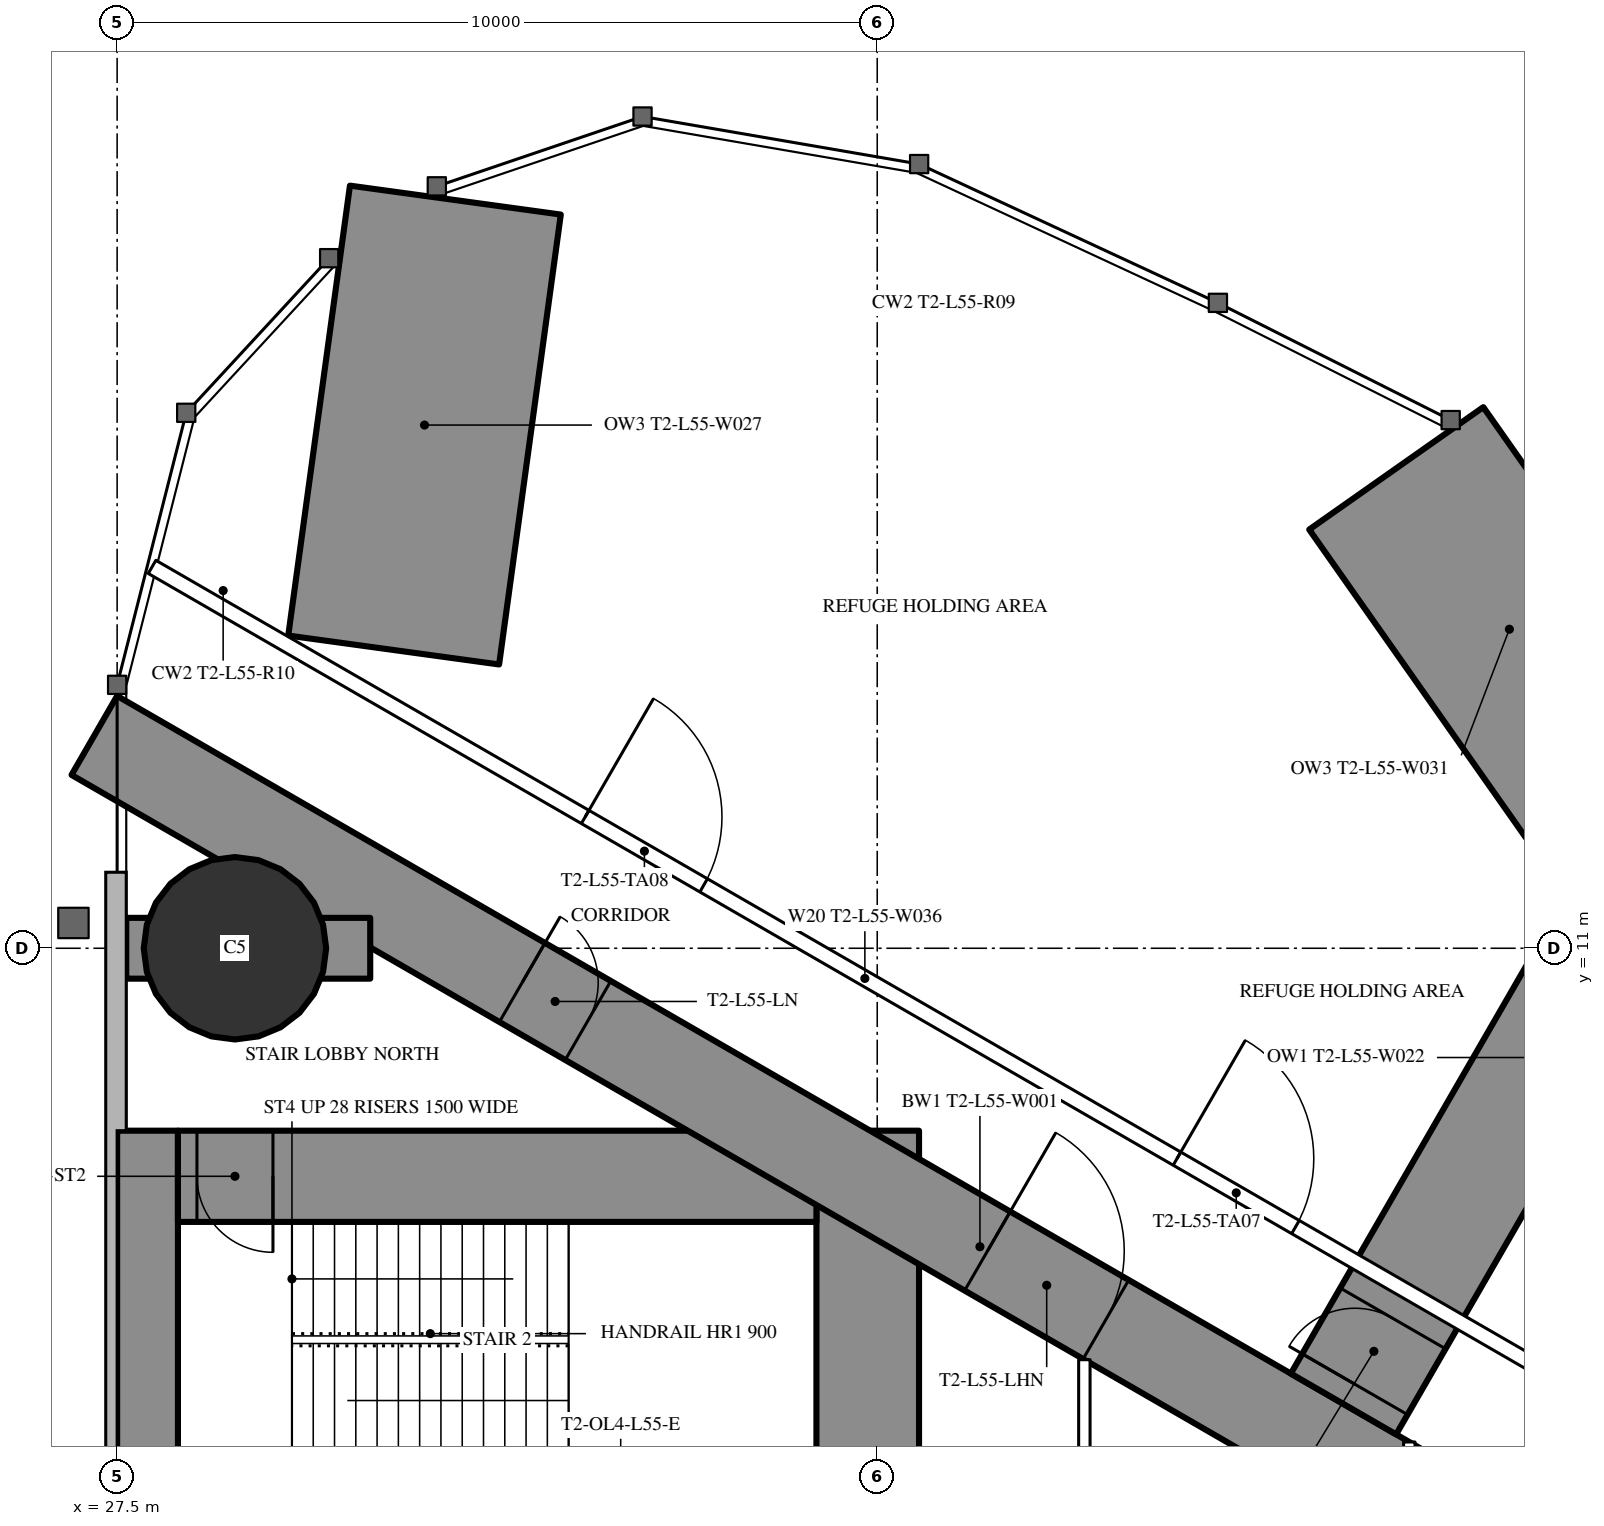
"""IFC4 building model, lengths in metres.
Left out: names, types, materials, properties, quantities, classifications, styles, units other than length and angle.
Written with IfcOpenShell. Run it as: python <this file> out.ifc"""

import sys

from ifc_helpers import new_model, si_unit, direction, frame, frame_2d, origin, origin_2d, place, context, subcontext, project, spatial, rectangle, hollow_circle, extrude, element, fill, save


model = new_model("IFC4")
c1 = context("Model", 3, precision=1e-05, world=origin(), true_north=direction((0.0, 1.0)))
c2 = subcontext(c1, "Body", "Model", "MODEL_VIEW")
j1 = project(units=[si_unit("LENGTHUNIT", "METRE"), si_unit("PLANEANGLEUNIT", "RADIAN")], contexts=[c1])
p1 = place(None, origin())
s1 = spatial("IfcSite", under=j1, at=p1, CompositionType="ELEMENT")
p2 = place(p1, origin())
s2 = spatial("IfcBuilding", under=s1, at=p2, CompositionType="ELEMENT")
p3 = place(p2, frame((0.0, 0.0, 205.3)))
s3 = spatial("IfcBuildingStorey", under=s2, at=p3, CompositionType="ELEMENT", Elevation=205.3)
p4 = place(p3, frame((31.95, 20.843, 0.0), z_axis=(0.0, 0.0, 1.0), x_axis=(-0.135869920729, -0.990726685136, 0.0)))
e1 = element("IfcWall", 1, at=p4, inside=s3, PredefinedType="SHEAR", context=c2, shape_type="SweptSolid", body=[
    extrude(rectangle(XDim=5.975, YDim=2.8, at=frame_2d((2.987, 0.0))), origin(), (0.0, 0.0, 1.0), 5.0),
])
p5 = place(p3, frame((29.05, 11.0, 0.0), z_axis=(0.0, 0.0, 1.0), x_axis=(1.0, 0.0, 0.0)))
e2 = element("IfcColumn", 2, at=p5, inside=s3, PredefinedType="COLUMN", context=c2, shape_type="SweptSolid", body=[
    extrude(hollow_circle(Radius=1.2, WallThickness=0.09, at=origin_2d()), origin(), (0.0, 0.0, 1.0), 5.0),
])
p6 = place(p3, frame((44.328, 17.314, 0.0), z_axis=(0.0, 0.0, 1.0), x_axis=(0.575107689221, -0.818077713789, 0.0)))
e3 = element("IfcWall", 3, at=p6, inside=s3, PredefinedType="SHEAR", context=c2, shape_type="SweptSolid", body=[
    extrude(rectangle(XDim=5.175, YDim=2.8, at=frame_2d((2.587, 0.0))), origin(), (0.0, 0.0, 1.0), 5.0),
])
p7 = place(p3, frame((27.9, -8.6, 0.0), z_axis=(0.0, 0.0, 1.0), x_axis=(0.0, 1.0, 0.0)))
e4 = element("IfcWall", 4, at=p7, inside=s3, PredefinedType="SHEAR", context=c2, shape_type="SweptSolid", body=[
    extrude(rectangle(XDim=17.2, YDim=0.8, at=frame_2d((8.6, 0.0))), origin(), (0.0, 0.0, 1.0), 5.0),
])
p8 = place(p7, frame((9.35, 0.0, 0.0)))
e5 = element("IfcOpeningElement", 5, at=p8, cuts=e4, PredefinedType="OPENING", context=c2, shape_type="SweptSolid", body=[
    extrude(rectangle(XDim=0.9, YDim=2.2, at=frame_2d((0.45, 1.1))), frame((0.0, 0.41, 0.0), z_axis=(0.0, -1.0, 0.0), x_axis=(1.0, 0.0, 0.0)), (0.0, 0.0, 1.0), 0.82),
])
p9 = place(p3, frame((37.375, -8.6, 0.0), z_axis=(0.0, 0.0, 1.0), x_axis=(0.0, 1.0, 0.0)))
e6 = element("IfcWall", 6, at=p9, inside=s3, PredefinedType="SHEAR", context=c2, shape_type="SweptSolid", body=[
    extrude(rectangle(XDim=17.2, YDim=1.35, at=frame_2d((8.6, 0.0))), origin(), (0.0, 0.0, 1.0), 5.0),
])
p10 = place(p9, frame((7.7, 0.0, 0.0)))
e7 = element("IfcOpeningElement", 7, at=p10, cuts=e6, PredefinedType="OPENING", context=c2, shape_type="SweptSolid", body=[
    extrude(rectangle(XDim=1.8, YDim=2.2, at=frame_2d((0.9, 1.1))), frame((0.0, 0.685, 0.0), z_axis=(0.0, -1.0, 0.0), x_axis=(1.0, 0.0, 0.0)), (0.0, 0.0, 1.0), 1.37),
])
p11 = place(p3, frame((28.3, 8.0, 0.0), z_axis=(0.0, 0.0, 1.0), x_axis=(1.0, 0.0, 0.0)))
e8 = element("IfcWall", 8, at=p11, inside=s3, PredefinedType="SHEAR", context=c2, shape_type="SweptSolid", body=[
    extrude(rectangle(XDim=8.4, YDim=1.2, at=frame_2d((4.2, 0.0))), origin(), (0.0, 0.0, 1.0), 5.0),
])
p12 = place(p11, frame((0.25, 0.0, 0.0)))
e9 = element("IfcOpeningElement", 9, at=p12, cuts=e8, PredefinedType="OPENING", context=c2, shape_type="SweptSolid", body=[
    extrude(rectangle(XDim=1.0, YDim=2.2, at=frame_2d((0.5, 1.1))), frame((0.0, 0.61, 0.0), z_axis=(0.0, -1.0, 0.0), x_axis=(1.0, 0.0, 0.0)), (0.0, 0.0, 1.0), 1.22),
])
p13 = place(p3, frame((27.2, 13.8, 0.0), z_axis=(0.0, 0.0, 1.0), x_axis=(0.866024515034, -0.500001539357, 0.0)))
e10 = element("IfcWall", 10, at=p13, inside=s3, PredefinedType="SHEAR", context=c2, shape_type="SweptSolid", body=[
    extrude(rectangle(XDim=26.907, YDim=1.2, at=frame_2d((13.454, 0.0))), origin(), (0.0, 0.0, 1.0), 5.0),
])
p14 = place(p13, frame((6.5, 0.0, 0.0)))
e11 = element("IfcOpeningElement", 11, at=p14, cuts=e10, PredefinedType="OPENING", context=c2, shape_type="SweptSolid", body=[
    extrude(rectangle(XDim=1.0, YDim=2.2, at=frame_2d((0.5, 1.1))), frame((0.0, 0.61, 0.0), z_axis=(0.0, -1.0, 0.0), x_axis=(1.0, 0.0, 0.0)), (0.0, 0.0, 1.0), 1.22),
])
p15 = place(p13, frame((13.568, 0.0, 0.0)))
e12 = element("IfcOpeningElement", 12, at=p15, cuts=e10, PredefinedType="OPENING", context=c2, shape_type="SweptSolid", body=[
    extrude(rectangle(XDim=1.8, YDim=2.2, at=frame_2d((0.9, 1.1))), frame((0.0, 0.61, 0.0), z_axis=(0.0, -1.0, 0.0), x_axis=(1.0, 0.0, 0.0)), (0.0, 0.0, 1.0), 1.22),
])
p16 = place(p3, frame((27.62, 11.0, 0.0), z_axis=(0.0, 0.0, 1.0), x_axis=(1.0, 0.0, 0.0)))
e13 = element("IfcWall", 13, at=p16, inside=s3, PredefinedType="SHEAR", context=c2, shape_type="SweptSolid", body=[
    extrude(rectangle(XDim=3.209, YDim=0.8, at=frame_2d((1.605, 0.0))), origin(), (0.0, 0.0, 1.0), 5.0),
])
p17 = place(p3, frame((43.634, 5.004, 0.0), z_axis=(0.0, 0.0, 1.0), x_axis=(0.499995493849, 0.866028005396, 0.0)))
e14 = element("IfcWall", 14, at=p17, inside=s3, PredefinedType="SHEAR", context=c2, shape_type="SweptSolid", body=[
    extrude(rectangle(XDim=10.526, YDim=1.6, at=frame_2d((5.263, 0.0))), origin(), (0.0, 0.0, 1.0), 5.0),
])
p18 = place(p17, frame((0.3, 0.0, 0.0)))
e15 = element("IfcOpeningElement", 15, at=p18, cuts=e14, PredefinedType="OPENING", context=c2, shape_type="SweptSolid", body=[
    extrude(rectangle(XDim=1.0, YDim=2.2, at=frame_2d((0.5, 1.1))), frame((0.0, 0.81, 0.0), z_axis=(0.0, -1.0, 0.0), x_axis=(1.0, 0.0, 0.0)), (0.0, 0.0, 1.0), 1.62),
])
p19 = place(p3, frame((27.959, 16.017, 0.0), z_axis=(0.0, 0.0, 1.0), x_axis=(0.866027146794, -0.499996981007, 0.0)))
e16 = element("IfcWall", 16, at=p19, inside=s3, PredefinedType="PARTITIONING", context=c2, shape_type="SweptSolid", body=[
    extrude(rectangle(XDim=21.657, YDim=0.2, at=frame_2d((10.829, 0.0))), origin(), (0.0, 0.0, 1.0), 4.75),
])
p20 = place(p19, frame((15.57, 0.0, 0.0)))
e17 = element("IfcOpeningElement", 17, at=p20, cuts=e16, PredefinedType="OPENING", context=c2, shape_type="SweptSolid", body=[
    extrude(rectangle(XDim=1.8, YDim=2.2, at=frame_2d((0.9, 1.1))), frame((0.0, 0.11, 0.0), z_axis=(0.0, -1.0, 0.0), x_axis=(1.0, 0.0, 0.0)), (0.0, 0.0, 1.0), 0.22),
])
p21 = place(p19, frame((6.579, 0.0, 0.0)))
e18 = element("IfcOpeningElement", 18, at=p21, cuts=e16, PredefinedType="OPENING", context=c2, shape_type="SweptSolid", body=[
    extrude(rectangle(XDim=1.8, YDim=2.2, at=frame_2d((0.9, 1.1))), frame((0.0, 0.11, 0.0), z_axis=(0.0, -1.0, 0.0), x_axis=(1.0, 0.0, 0.0)), (0.0, 0.0, 1.0), 0.22),
])
p22 = place(p3, frame((40.225, -5.587, 0.0), z_axis=(0.0, 0.0, 1.0), x_axis=(0.0, 1.0, 0.0)))
e19 = element("IfcWall", 19, at=p22, inside=s3, PredefinedType="PARTITIONING", context=c2, shape_type="SweptSolid", body=[
    extrude(rectangle(XDim=11.174, YDim=0.15, at=frame_2d((5.587, 0.0))), origin(), (0.0, 0.0, 1.0), 4.75),
])
p23 = place(p22, frame((4.687, 0.0, 0.0)))
e20 = element("IfcOpeningElement", 20, at=p23, cuts=e19, PredefinedType="OPENING", context=c2, shape_type="SweptSolid", body=[
    extrude(rectangle(XDim=1.8, YDim=2.2, at=frame_2d((0.9, 1.1))), frame((0.0, 0.085, 0.0), z_axis=(0.0, -1.0, 0.0), x_axis=(1.0, 0.0, 0.0)), (0.0, 0.0, 1.0), 0.17),
])
p24 = place(p3, frame((44.5, -4.505, 0.0), z_axis=(0.0, 0.0, 1.0), x_axis=(0.0, 1.0, 0.0)))
e21 = element("IfcWall", 21, at=p24, inside=s3, PredefinedType="PARTITIONING", context=c2, shape_type="SweptSolid", body=[
    extrude(rectangle(XDim=9.009, YDim=0.15, at=frame_2d((4.505, 0.0))), origin(), (0.0, 0.0, 1.0), 4.75),
])
p25 = place(p24, frame((4.005, 0.0, 0.0)))
e22 = element("IfcOpeningElement", 22, at=p25, cuts=e21, PredefinedType="OPENING", context=c2, shape_type="SweptSolid", body=[
    extrude(rectangle(XDim=1.0, YDim=2.2, at=frame_2d((0.5, 1.1))), frame((0.0, 0.085, 0.0), z_axis=(0.0, -1.0, 0.0), x_axis=(1.0, 0.0, 0.0)), (0.0, 0.0, 1.0), 0.17),
])
p26 = place(p18, origin())
e23 = element("IfcDoor", 23, at=p26, inside=s3, OperationType="SINGLE_SWING_LEFT", PredefinedType="DOOR", context=c2, shape_type="SweptSolid", body=[
    extrude(rectangle(XDim=1.0, YDim=2.2, at=frame_2d((0.5, 1.1))), frame((0.0, 0.025, 0.0), z_axis=(0.0, -1.0, 0.0), x_axis=(1.0, 0.0, 0.0)), (0.0, 0.0, 1.0), 0.05),
])
fill(e15, e23)
p27 = place(p20, origin())
e24 = element("IfcDoor", 24, at=p27, inside=s3, OperationType="DOUBLE_DOOR_SINGLE_SWING", PredefinedType="DOOR", context=c2, shape_type="SweptSolid", body=[
    extrude(rectangle(XDim=1.8, YDim=2.2, at=frame_2d((0.9, 1.1))), frame((0.0, 0.025, 0.0), z_axis=(0.0, -1.0, 0.0), x_axis=(1.0, 0.0, 0.0)), (0.0, 0.0, 1.0), 0.05),
])
fill(e17, e24)
p28 = place(p21, origin())
e25 = element("IfcDoor", 25, at=p28, inside=s3, OperationType="DOUBLE_DOOR_SINGLE_SWING", PredefinedType="DOOR", context=c2, shape_type="SweptSolid", body=[
    extrude(rectangle(XDim=1.8, YDim=2.2, at=frame_2d((0.9, 1.1))), frame((0.0, 0.025, 0.0), z_axis=(0.0, -1.0, 0.0), x_axis=(1.0, 0.0, 0.0)), (0.0, 0.0, 1.0), 0.05),
])
fill(e18, e25)
p29 = place(p14, origin())
e26 = element("IfcDoor", 26, at=p29, inside=s3, OperationType="SINGLE_SWING_LEFT", PredefinedType="DOOR", context=c2, shape_type="SweptSolid", body=[
    extrude(rectangle(XDim=1.0, YDim=2.2, at=frame_2d((0.5, 1.1))), frame((0.0, 0.025, 0.0), z_axis=(0.0, -1.0, 0.0), x_axis=(1.0, 0.0, 0.0)), (0.0, 0.0, 1.0), 0.05),
])
fill(e11, e26)
p30 = place(p15, origin())
e27 = element("IfcDoor", 27, at=p30, inside=s3, OperationType="DOUBLE_DOOR_SINGLE_SWING", PredefinedType="DOOR", context=c2, shape_type="SweptSolid", body=[
    extrude(rectangle(XDim=1.8, YDim=2.2, at=frame_2d((0.9, 1.1))), frame((0.0, 0.025, 0.0), z_axis=(0.0, -1.0, 0.0), x_axis=(1.0, 0.0, 0.0)), (0.0, 0.0, 1.0), 0.05),
])
fill(e12, e27)
p31 = place(p12, origin())
e28 = element("IfcDoor", 28, at=p31, inside=s3, OperationType="SINGLE_SWING_RIGHT", PredefinedType="DOOR", context=c2, shape_type="SweptSolid", body=[
    extrude(rectangle(XDim=1.0, YDim=2.2, at=frame_2d((0.5, 1.1))), frame((0.0, 0.025, 0.0), z_axis=(0.0, -1.0, 0.0), x_axis=(1.0, 0.0, 0.0)), (0.0, 0.0, 1.0), 0.05),
])
fill(e9, e28)
save(model, sys.argv[1])
